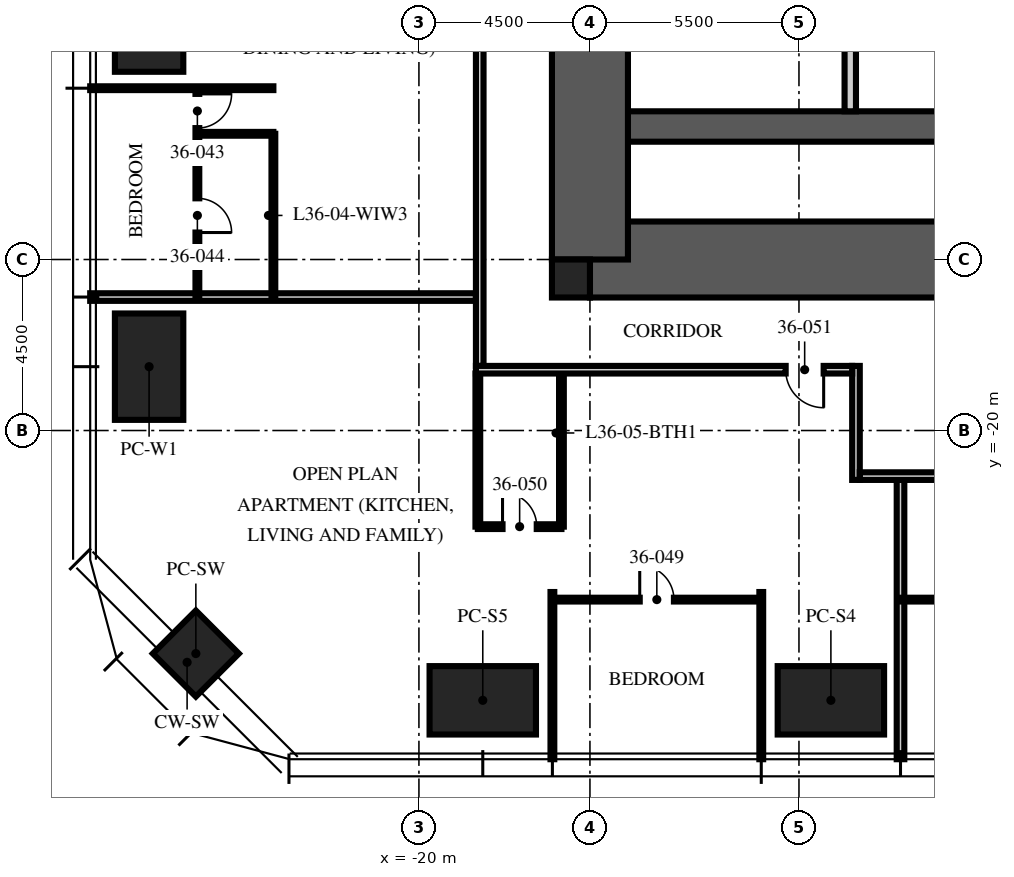
"""IFC4 building model, lengths in metres.
Left out: names, types, materials, properties, quantities, classifications, styles, units other than length and angle.
Written with IfcOpenShell. Run it as: python <this file> out.ifc"""

import sys

from ifc_helpers import new_model, si_unit, direction, frame, frame_2d, origin, origin_2d, place, context, subcontext, project, spatial, rectangle, extrude, element, fill, save


model = new_model("IFC4")
c1 = context("Model", 3, precision=1e-05, world=origin(), true_north=direction((0.0, 1.0)))
c2 = subcontext(c1, "Body", "Model", "MODEL_VIEW")
j1 = project(units=[si_unit("LENGTHUNIT", "METRE"), si_unit("PLANEANGLEUNIT", "RADIAN")], contexts=[c1])
p1 = place(None, origin())
s1 = spatial("IfcSite", under=j1, at=p1, CompositionType="ELEMENT")
p2 = place(p1, origin())
s2 = spatial("IfcBuilding", under=s1, at=p2, CompositionType="ELEMENT")
p3 = place(p2, frame((0.0, 0.0, 144.75)))
s3 = spatial("IfcBuildingStorey", under=s2, at=p3, CompositionType="ELEMENT", Elevation=144.75)
p4 = place(p3, frame((-15.5, -15.5, -0.25), z_axis=(0.0, 0.0, 1.0), x_axis=(1.0, 0.0, 0.0)))
e1 = element("IfcWall", 1, at=p4, inside=s3, PredefinedType="SHEAR", context=c2, shape_type="SweptSolid", body=[
    extrude(rectangle(XDim=31.0, YDim=2.0, at=frame_2d((15.5, 0.0))), origin(), (0.0, 0.0, 1.0), 3.75),
])
p5 = place(p4, frame((10.4, 0.0, 0.25)))
e2 = element("IfcOpeningElement", 2, at=p5, cuts=e1, PredefinedType="OPENING", context=c2, shape_type="SweptSolid", body=[
    extrude(rectangle(XDim=1.1, YDim=2.1, at=frame_2d((0.55, 1.05))), frame((0.0, 1.01, 0.0), z_axis=(0.0, -1.0, 0.0), x_axis=(1.0, 0.0, 0.0)), (0.0, 0.0, 1.0), 2.02),
])
p6 = place(p4, frame((13.5, 0.0, 0.25)))
e3 = element("IfcOpeningElement", 3, at=p6, cuts=e1, PredefinedType="OPENING", context=c2, shape_type="SweptSolid", body=[
    extrude(rectangle(XDim=1.1, YDim=2.1, at=frame_2d((0.55, 1.05))), frame((0.0, 1.01, 0.0), z_axis=(0.0, -1.0, 0.0), x_axis=(1.0, 0.0, 0.0)), (0.0, 0.0, 1.0), 2.02),
])
p7 = place(p4, frame((16.6, 0.0, 0.25)))
e4 = element("IfcOpeningElement", 4, at=p7, cuts=e1, PredefinedType="OPENING", context=c2, shape_type="SweptSolid", body=[
    extrude(rectangle(XDim=1.1, YDim=2.1, at=frame_2d((0.55, 1.05))), frame((0.0, 1.01, 0.0), z_axis=(0.0, -1.0, 0.0), x_axis=(1.0, 0.0, 0.0)), (0.0, 0.0, 1.0), 2.02),
])
p8 = place(p3, frame((-15.5, -12.0, -0.25), z_axis=(0.0, 0.0, 1.0), x_axis=(1.0, 0.0, 0.0)))
e5 = element("IfcWall", 5, at=p8, inside=s3, PredefinedType="SHEAR", context=c2, shape_type="SweptSolid", body=[
    extrude(rectangle(XDim=31.0, YDim=0.8, at=frame_2d((15.5, 0.0))), origin(), (0.0, 0.0, 1.0), 3.75),
])
p9 = place(p3, frame((-15.5, -15.5, -0.25), z_axis=(0.0, 0.0, 1.0), x_axis=(0.0, 1.0, 0.0)))
e6 = element("IfcWall", 6, at=p9, inside=s3, PredefinedType="SHEAR", context=c2, shape_type="SweptSolid", body=[
    extrude(rectangle(XDim=31.0, YDim=2.0, at=frame_2d((15.5, 0.0))), origin(), (0.0, 0.0, 1.0), 3.75),
])
p10 = place(p9, frame((6.5, 0.0, 0.25)))
e7 = element("IfcOpeningElement", 7, at=p10, cuts=e6, PredefinedType="OPENING", context=c2, shape_type="SweptSolid", body=[
    extrude(rectangle(XDim=1.2, YDim=2.1, at=frame_2d((0.6, 1.05))), frame((0.0, 1.01, 0.0), z_axis=(0.0, -1.0, 0.0), x_axis=(1.0, 0.0, 0.0)), (0.0, 0.0, 1.0), 2.02),
])
p11 = place(p9, frame((23.0, 0.0, 0.25)))
e8 = element("IfcOpeningElement", 8, at=p11, cuts=e6, PredefinedType="OPENING", context=c2, shape_type="SweptSolid", body=[
    extrude(rectangle(XDim=1.8, YDim=2.1, at=frame_2d((0.9, 1.05))), frame((0.0, 1.01, 0.0), z_axis=(0.0, -1.0, 0.0), x_axis=(1.0, 0.0, 0.0)), (0.0, 0.0, 1.0), 2.02),
])
p12 = place(p3, frame((-16.0, -16.0, -0.25), z_axis=(0.0, 0.0, 1.0), x_axis=(1.0, 0.0, 0.0)))
e9 = element("IfcColumn", 9, at=p12, inside=s3, PredefinedType="COLUMN", context=c2, shape_type="SweptSolid", body=[
    extrude(rectangle(XDim=1.0, YDim=1.0, at=origin_2d()), origin(), (0.0, 0.0, 1.0), 3.75),
])
for number, where, z_axis, x_axis in (
    (10, (-9.16, -27.1, 0.0), (0.0, 0.0, 1.0), (1.0, 0.0, 0.0)),
    (11, (-18.32, -27.1, 0.0), (0.0, 0.0, 1.0), (1.0, 0.0, 0.0)),
    (12, (-27.1, -18.32, 0.0), (0.0, 0.0, 1.0), (0.0, 1.0, 0.0)),
    (13, (-27.1, -9.16, 0.0), (0.0, 0.0, 1.0), (0.0, 1.0, 0.0)),
):
    element("IfcColumn", number, at=place(p3, frame(where, z_axis=z_axis, x_axis=x_axis)), inside=s3, PredefinedType="COLUMN", context=c2, shape_type="SweptSolid", body=[
        extrude(rectangle(XDim=2.8, YDim=1.8, at=origin_2d()), origin(), (0.0, 0.0, 1.0), 3.75),
    ])
p13 = place(p3, frame((-25.87, -25.87, 0.0), z_axis=(0.0, 0.0, 1.0), x_axis=(0.707106781187, -0.707106781187, 0.0)))
e14 = element("IfcColumn", 14, at=p13, inside=s3, PredefinedType="COLUMN", context=c2, shape_type="SweptSolid", body=[
    extrude(rectangle(XDim=1.6, YDim=1.6, at=origin_2d()), origin(), (0.0, 0.0, 1.0), 3.75),
])
p14 = place(p3, frame((-8.65, -11.6, 0.0), z_axis=(0.0, 0.0, 1.0), x_axis=(0.0, 1.0, 0.0)))
e15 = element("IfcWall", 15, at=p14, inside=s3, PredefinedType="PARTITIONING", context=c2, shape_type="SweptSolid", body=[
    extrude(rectangle(XDim=6.7, YDim=0.3, at=frame_2d((3.35, 0.0))), origin(), (0.0, 0.0, 1.0), 3.5),
])
p15 = place(p14, frame((2.85, 0.0, 0.0)))
e16 = element("IfcOpeningElement", 16, at=p15, cuts=e15, PredefinedType="OPENING", context=c2, shape_type="SweptSolid", body=[
    extrude(rectangle(XDim=1.1, YDim=2.1, at=frame_2d((0.55, 1.05))), frame((0.0, 0.16, 0.0), z_axis=(0.0, -1.0, 0.0), x_axis=(1.0, 0.0, 0.0)), (0.0, 0.0, 1.0), 0.32),
])
p16 = place(p3, frame((-23.83, -10.992, 0.0), z_axis=(0.0, 0.0, 1.0), x_axis=(-1.0, 0.0, 0.0)))
e17 = element("IfcWall", 17, at=p16, inside=s3, PredefinedType="PARTITIONING", context=c2, shape_type="SweptSolid", body=[
    extrude(rectangle(XDim=4.82, YDim=0.1, at=frame_2d((2.41, 0.0))), origin(), (0.0, 0.0, 1.0), 2.81),
])
p17 = place(p3, frame((-18.5, -16.488, 0.0), z_axis=(0.0, 0.0, 1.0), x_axis=(-1.0, 0.0, 0.0)))
e18 = element("IfcWall", 18, at=p17, inside=s3, PredefinedType="PARTITIONING", context=c2, shape_type="SweptSolid", body=[
    extrude(rectangle(XDim=10.15, YDim=0.2, at=frame_2d((5.075, 0.0))), origin(), (0.0, 0.0, 1.0), 2.81),
])
for number, where, z_axis, x_axis in (
    (19, (-16.488, -24.25, 0.0), (0.0, 0.0, 1.0), (0.0, -1.0, 0.0)),
    (20, (-10.992, -24.25, 0.0), (0.0, 0.0, 1.0), (0.0, -1.0, 0.0)),
):
    element("IfcWall", number, at=place(p3, frame(where, z_axis=z_axis, x_axis=x_axis)), inside=s3, PredefinedType="PARTITIONING", context=c2, shape_type="SweptSolid", body=[
        extrude(rectangle(XDim=4.4, YDim=0.1, at=frame_2d((2.2, 0.0))), origin(), (0.0, 0.0, 1.0), 2.81),
    ])
p18 = place(p3, frame((-7.328, -21.3, 0.0), z_axis=(0.0, 0.0, 1.0), x_axis=(0.0, -1.0, 0.0)))
e21 = element("IfcWall", 21, at=p18, inside=s3, PredefinedType="PARTITIONING", context=c2, shape_type="SweptSolid", body=[
    extrude(rectangle(XDim=7.35, YDim=0.2, at=frame_2d((3.675, 0.0))), origin(), (0.0, 0.0, 1.0), 2.81),
])
p19 = place(p3, frame((-25.83, -10.992, 0.0), z_axis=(0.0, 0.0, 1.0), x_axis=(0.0, -1.0, 0.0)))
e22 = element("IfcWall", 22, at=p19, inside=s3, PredefinedType="PARTITIONING", context=c2, shape_type="SweptSolid", body=[
    extrude(rectangle(XDim=5.496, YDim=0.1, at=frame_2d((2.748, 0.0))), origin(), (0.0, 0.0, 1.0), 2.81),
])
p20 = place(p19, frame((0.15, 0.0, 0.0)))
e23 = element("IfcOpeningElement", 23, at=p20, cuts=e22, PredefinedType="OPENING", context=c2, shape_type="SweptSolid", body=[
    extrude(rectangle(XDim=0.9, YDim=2.1, at=frame_2d((0.45, 1.05))), frame((0.0, 0.06, 0.0), z_axis=(0.0, -1.0, 0.0), x_axis=(1.0, 0.0, 0.0)), (0.0, 0.0, 1.0), 0.12),
])
p21 = place(p19, frame((2.898, 0.0, 0.0)))
e24 = element("IfcOpeningElement", 24, at=p21, cuts=e22, PredefinedType="OPENING", context=c2, shape_type="SweptSolid", body=[
    extrude(rectangle(XDim=0.9, YDim=2.1, at=frame_2d((0.45, 1.05))), frame((0.0, 0.06, 0.0), z_axis=(0.0, -1.0, 0.0), x_axis=(1.0, 0.0, 0.0)), (0.0, 0.0, 1.0), 0.12),
])
p22 = place(p3, frame((-23.83, -12.192, 0.0), z_axis=(0.0, 0.0, 1.0), x_axis=(-1.0, 0.0, 0.0)))
e25 = element("IfcWall", 25, at=p22, inside=s3, PredefinedType="PARTITIONING", context=c2, shape_type="SweptSolid", body=[
    extrude(rectangle(XDim=2.0, YDim=0.1, at=frame_2d((1.0, 0.0))), origin(), (0.0, 0.0, 1.0), 3.5),
])
p23 = place(p3, frame((-23.83, -12.192, 0.0), z_axis=(0.0, 0.0, 1.0), x_axis=(0.0, -1.0, 0.0)))
e26 = element("IfcWall", 26, at=p23, inside=s3, PredefinedType="PARTITIONING", context=c2, shape_type="SweptSolid", body=[
    extrude(rectangle(XDim=4.296, YDim=0.1, at=frame_2d((2.148, 0.0))), origin(), (0.0, 0.0, 1.0), 2.81),
])
p24 = place(p3, frame((-16.488, -24.45, 0.0), z_axis=(0.0, 0.0, 1.0), x_axis=(1.0, 0.0, 0.0)))
e27 = element("IfcWall", 27, at=p24, inside=s3, PredefinedType="PARTITIONING", context=c2, shape_type="SweptSolid", body=[
    extrude(rectangle(XDim=5.496, YDim=0.1, at=frame_2d((2.748, 0.0))), origin(), (0.0, 0.0, 1.0), 2.81),
])
p25 = place(p24, frame((2.298, 0.0, 0.0)))
e28 = element("IfcOpeningElement", 28, at=p25, cuts=e27, PredefinedType="OPENING", context=c2, shape_type="SweptSolid", body=[
    extrude(rectangle(XDim=0.9, YDim=2.1, at=frame_2d((0.45, 1.05))), frame((0.0, 0.06, 0.0), z_axis=(0.0, -1.0, 0.0), x_axis=(1.0, 0.0, 0.0)), (0.0, 0.0, 1.0), 0.12),
])
p26 = place(p3, frame((-18.45, -22.53, 0.0), z_axis=(0.0, 0.0, 1.0), x_axis=(1.0, 0.0, 0.0)))
e29 = element("IfcWall", 29, at=p26, inside=s3, PredefinedType="PARTITIONING", context=c2, shape_type="SweptSolid", body=[
    extrude(rectangle(XDim=2.2, YDim=0.125, at=frame_2d((1.1, 0.0))), origin(), (0.0, 0.0, 1.0), 2.7),
])
p27 = place(p26, frame((0.65, 0.0, 0.0)))
e30 = element("IfcOpeningElement", 30, at=p27, cuts=e29, PredefinedType="OPENING", context=c2, shape_type="SweptSolid", body=[
    extrude(rectangle(XDim=0.9, YDim=2.1, at=frame_2d((0.45, 1.05))), frame((0.0, 0.073, 0.0), z_axis=(0.0, -1.0, 0.0), x_axis=(1.0, 0.0, 0.0)), (0.0, 0.0, 1.0), 0.145),
])
p28 = place(p3, frame((-18.45, -18.5, 0.0), z_axis=(0.0, 0.0, 1.0), x_axis=(0.0, -1.0, 0.0)))
e31 = element("IfcWall", 31, at=p28, inside=s3, PredefinedType="PARTITIONING", context=c2, shape_type="SweptSolid", body=[
    extrude(rectangle(XDim=4.03, YDim=0.125, at=frame_2d((2.015, 0.0))), origin(), (0.0, 0.0, 1.0), 2.3),
])
p29 = place(p3, frame((-16.25, -18.5, 0.0), z_axis=(0.0, 0.0, 1.0), x_axis=(0.0, -1.0, 0.0)))
e32 = element("IfcWall", 32, at=p29, inside=s3, PredefinedType="PARTITIONING", context=c2, shape_type="SweptSolid", body=[
    extrude(rectangle(XDim=4.03, YDim=0.125, at=frame_2d((2.015, 0.0))), origin(), (0.0, 0.0, 1.0), 3.5),
])
p30 = place(p3, frame((-7.328, -24.45, 0.0), z_axis=(0.0, 0.0, 1.0), x_axis=(1.0, 0.0, 0.0)))
e33 = element("IfcWall", 33, at=p30, inside=s3, PredefinedType="PARTITIONING", context=c2, shape_type="SweptSolid", body=[
    extrude(rectangle(XDim=5.496, YDim=0.1, at=frame_2d((2.748, 0.0))), origin(), (0.0, 0.0, 1.0), 2.81),
])
p31 = place(p30, frame((2.298, 0.0, 0.0)))
e34 = element("IfcOpeningElement", 34, at=p31, cuts=e33, PredefinedType="OPENING", context=c2, shape_type="SweptSolid", body=[
    extrude(rectangle(XDim=0.9, YDim=2.1, at=frame_2d((0.45, 1.05))), frame((0.0, 0.06, 0.0), z_axis=(0.0, -1.0, 0.0), x_axis=(1.0, 0.0, 0.0)), (0.0, 0.0, 1.0), 0.12),
])
p32 = place(p3, frame((-18.4, 5.328, 0.0), z_axis=(0.0, 0.0, 1.0), x_axis=(0.0, -1.0, 0.0)))
e35 = element("IfcWall", 35, at=p32, inside=s3, PredefinedType="PARTITIONING", context=c2, shape_type="SweptSolid", body=[
    extrude(rectangle(XDim=23.628, YDim=0.2, at=frame_2d((11.814, 0.0))), origin(), (0.0, 0.0, 1.0), 2.3),
])
p33 = place(p3, frame((-8.5, -18.3, 0.0), z_axis=(0.0, 0.0, 1.0), x_axis=(0.0, -1.0, 0.0)))
e36 = element("IfcWall", 36, at=p33, inside=s3, PredefinedType="PARTITIONING", context=c2, shape_type="SweptSolid", body=[
    extrude(rectangle(XDim=3.0, YDim=0.2, at=frame_2d((1.5, 0.0))), origin(), (0.0, 0.0, 1.0), 3.5),
])
p34 = place(p3, frame((5.4, -21.2, 0.0), z_axis=(0.0, 0.0, 1.0), x_axis=(-1.0, 0.0, 0.0)))
e37 = element("IfcWall", 37, at=p34, inside=s3, PredefinedType="PARTITIONING", context=c2, shape_type="SweptSolid", body=[
    extrude(rectangle(XDim=13.8, YDim=0.2, at=frame_2d((6.9, 0.0))), origin(), (0.0, 0.0, 1.0), 2.7),
])
p35 = place(p34, frame((0.958, 0.0, 0.0)))
e38 = element("IfcOpeningElement", 38, at=p35, cuts=e37, PredefinedType="OPENING", context=c2, shape_type="SweptSolid", body=[
    extrude(rectangle(XDim=1.0, YDim=2.2, at=frame_2d((0.5, 1.1))), frame((0.0, 0.11, 0.0), z_axis=(0.0, -1.0, 0.0), x_axis=(1.0, 0.0, 0.0)), (0.0, 0.0, 1.0), 0.22),
])
p36 = place(p3, frame((-8.6, -18.4, 0.0), z_axis=(0.0, 0.0, 1.0), x_axis=(-1.0, 0.0, 0.0)))
e39 = element("IfcWall", 39, at=p36, inside=s3, PredefinedType="PARTITIONING", context=c2, shape_type="SweptSolid", body=[
    extrude(rectangle(XDim=9.9, YDim=0.2, at=frame_2d((4.95, 0.0))), origin(), (0.0, 0.0, 1.0), 2.3),
])
p37 = place(p36, frame((0.75, 0.0, 0.0)))
e40 = element("IfcOpeningElement", 40, at=p37, cuts=e39, PredefinedType="OPENING", context=c2, shape_type="SweptSolid", body=[
    extrude(rectangle(XDim=1.0, YDim=2.2, at=frame_2d((0.5, 1.1))), frame((0.0, 0.11, 0.0), z_axis=(0.0, -1.0, 0.0), x_axis=(1.0, 0.0, 0.0)), (0.0, 0.0, 1.0), 0.22),
])
p38 = place(p20, origin())
e41 = element("IfcDoor", 41, at=p38, inside=s3, OperationType="SINGLE_SWING_LEFT", PredefinedType="DOOR", context=c2, shape_type="SweptSolid", body=[
    extrude(rectangle(XDim=0.9, YDim=2.1, at=frame_2d((0.45, 1.05))), frame((0.0, 0.025, 0.0), z_axis=(0.0, -1.0, 0.0), x_axis=(1.0, 0.0, 0.0)), (0.0, 0.0, 1.0), 0.05),
])
fill(e23, e41)
p39 = place(p21, origin())
e42 = element("IfcDoor", 42, at=p39, inside=s3, OperationType="SINGLE_SWING_RIGHT", PredefinedType="DOOR", context=c2, shape_type="SweptSolid", body=[
    extrude(rectangle(XDim=0.9, YDim=2.1, at=frame_2d((0.45, 1.05))), frame((0.0, 0.025, 0.0), z_axis=(0.0, -1.0, 0.0), x_axis=(1.0, 0.0, 0.0)), (0.0, 0.0, 1.0), 0.05),
])
fill(e24, e42)
p40 = place(p25, origin())
e43 = element("IfcDoor", 43, at=p40, inside=s3, OperationType="SINGLE_SWING_LEFT", PredefinedType="DOOR", context=c2, shape_type="SweptSolid", body=[
    extrude(rectangle(XDim=0.9, YDim=2.1, at=frame_2d((0.45, 1.05))), frame((0.0, 0.025, 0.0), z_axis=(0.0, -1.0, 0.0), x_axis=(1.0, 0.0, 0.0)), (0.0, 0.0, 1.0), 0.05),
])
fill(e28, e43)
p41 = place(p27, origin())
e44 = element("IfcDoor", 44, at=p41, inside=s3, OperationType="SINGLE_SWING_LEFT", PredefinedType="DOOR", context=c2, shape_type="SweptSolid", body=[
    extrude(rectangle(XDim=0.9, YDim=2.1, at=frame_2d((0.45, 1.05))), frame((0.0, 0.025, 0.0), z_axis=(0.0, -1.0, 0.0), x_axis=(1.0, 0.0, 0.0)), (0.0, 0.0, 1.0), 0.05),
])
fill(e30, e44)
p42 = place(p37, origin())
e45 = element("IfcDoor", 45, at=p42, inside=s3, OperationType="SINGLE_SWING_LEFT", PredefinedType="DOOR", context=c2, shape_type="SweptSolid", body=[
    extrude(rectangle(XDim=1.0, YDim=2.2, at=frame_2d((0.5, 1.1))), frame((0.0, 0.025, 0.0), z_axis=(0.0, -1.0, 0.0), x_axis=(1.0, 0.0, 0.0)), (0.0, 0.0, 1.0), 0.05),
])
fill(e40, e45)
save(model, sys.argv[1])
